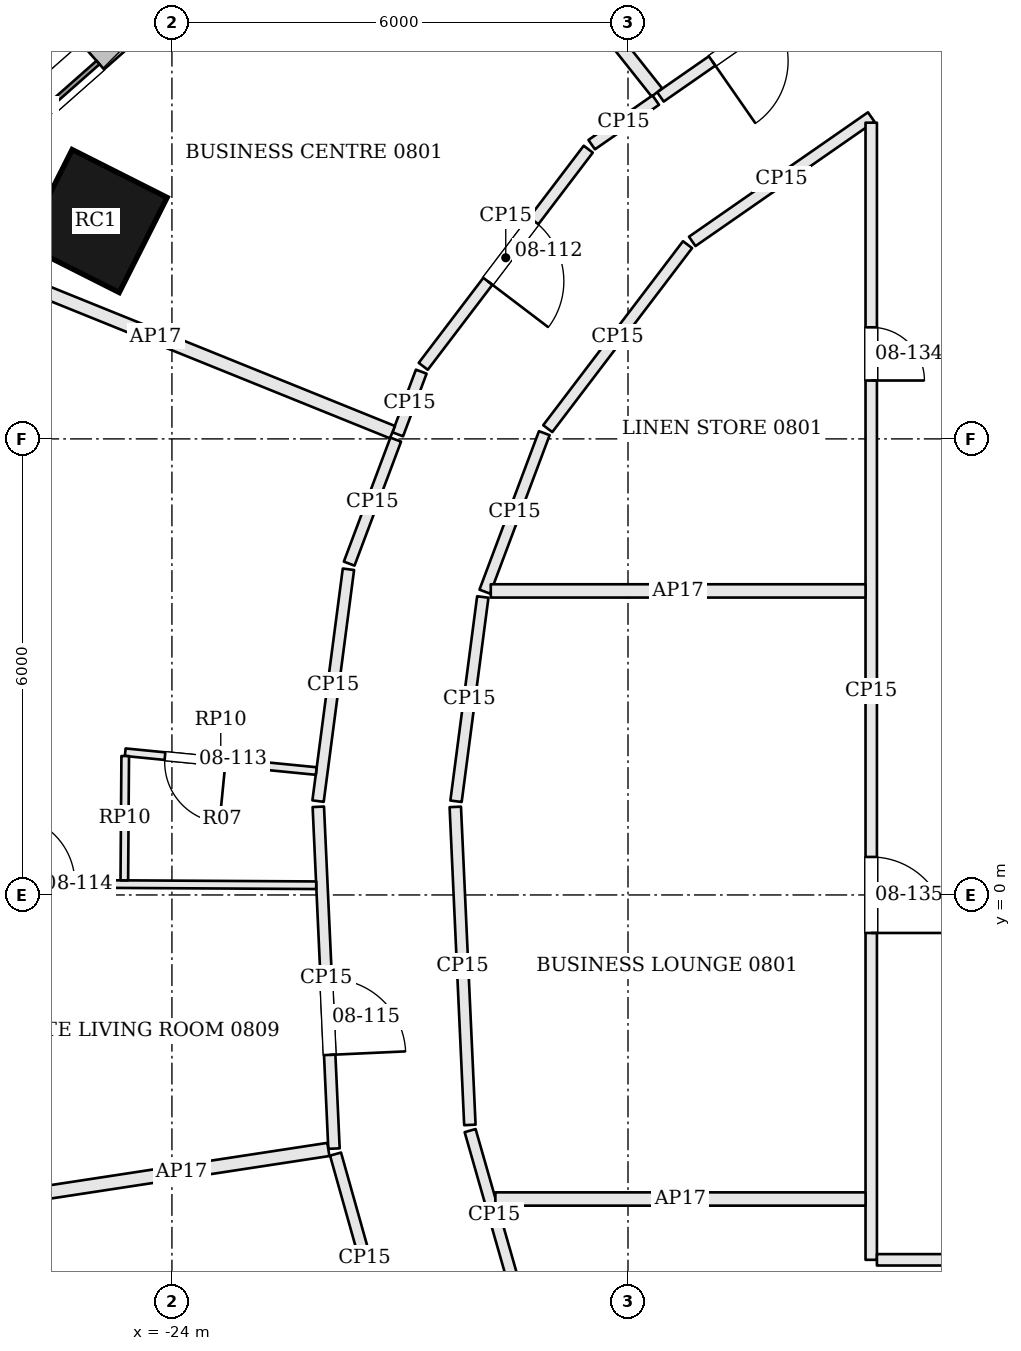
"""IFC4 building model, lengths in metres.
Left out: names, types, materials, properties, quantities, classifications, styles, units other than length and angle.
Written with IfcOpenShell. Run it as: python <this file> out.ifc"""

import sys

from ifc_helpers import new_model, si_unit, direction, frame, frame_2d, origin, origin_2d, place, context, subcontext, project, spatial, rectangle, extrude, element, fill, save


model = new_model("IFC4")
c1 = context("Model", 3, precision=1e-05, world=origin(), true_north=direction((0.0, 1.0)))
c2 = subcontext(c1, "Body", "Model", "MODEL_VIEW")
j1 = project(units=[si_unit("LENGTHUNIT", "METRE"), si_unit("PLANEANGLEUNIT", "RADIAN")], contexts=[c1])
p1 = place(None, origin())
s1 = spatial("IfcSite", under=j1, at=p1, CompositionType="ELEMENT")
p2 = place(p1, origin())
s2 = spatial("IfcBuilding", under=s1, at=p2, CompositionType="ELEMENT")
p3 = place(p2, frame((0.0, 0.0, 44.7)))
s3 = spatial("IfcBuildingStorey", under=s2, at=p3, CompositionType="ELEMENT", Elevation=44.7)
p4 = place(p3, frame((-25.003, 8.866, 0.0), z_axis=(0.0, 0.0, 1.0), x_axis=(-0.450098906028, -0.892978709036, 0.0)))
e1 = element("IfcColumn", 1, at=p4, inside=s3, PredefinedType="COLUMN", context=c2, shape_type="SweptSolid", body=[
    extrude(rectangle(XDim=1.4, YDim=1.4, at=origin_2d()), origin(), (0.0, 0.0, 1.0), 3.6),
])
p5 = place(p3, frame((-24.078, 11.88, 0.0), z_axis=(0.0, 0.0, 1.0), x_axis=(-0.749778352475, -0.661689067583, 0.0)))
e2 = element("IfcWall", 2, at=p5, inside=s3, PredefinedType="SOLIDWALL", context=c2, shape_type="SweptSolid", body=[
    extrude(rectangle(XDim=4.67, YDim=0.45, at=frame_2d((2.335, 0.0))), origin(), (0.0, 0.0, 1.0), 3.4),
])
p6 = place(p5, frame((1.285, 0.0, 0.9)))
e3 = element("IfcOpeningElement", 3, at=p6, cuts=e2, PredefinedType="OPENING", context=c2, shape_type="SweptSolid", body=[
    extrude(rectangle(XDim=2.1, YDim=2.0, at=frame_2d((1.05, 1.0))), frame((0.0, 0.235, 0.0), z_axis=(0.0, -1.0, 0.0), x_axis=(1.0, 0.0, 0.0)), (0.0, 0.0, 1.0), 0.47),
])
p7 = place(p3, frame((-14.862, 12.384, 0.0), z_axis=(0.0, 0.0, 1.0), x_axis=(-0.821144742038, -0.570719994939, 0.0)))
e4 = element("IfcWall", 4, at=p7, inside=s3, PredefinedType="PARTITIONING", context=c2, shape_type="SweptSolid", body=[
    extrude(rectangle(XDim=3.302, YDim=0.15, at=frame_2d((1.651, 0.0))), origin(), (0.0, 0.0, 1.0), 2.68),
])
p8 = place(p7, frame((1.474, 0.0, 0.0)))
e5 = element("IfcOpeningElement", 5, at=p8, cuts=e4, PredefinedType="OPENING", context=c2, shape_type="SweptSolid", body=[
    extrude(rectangle(XDim=1.0, YDim=2.1, at=frame_2d((0.5, 1.05))), frame((0.0, 0.085, 0.0), z_axis=(0.0, -1.0, 0.0), x_axis=(1.0, 0.0, 0.0)), (0.0, 0.0, 1.0), 0.17),
])
p9 = place(p3, frame((-20.146, 13.74, 0.0), z_axis=(0.0, 0.0, 1.0), x_axis=(0.621832273855, -0.783150447355, 0.0)))
e6 = element("IfcWall", 6, at=p9, inside=s3, PredefinedType="PARTITIONING", context=c2, shape_type="SweptSolid", body=[
    extrude(rectangle(XDim=4.062, YDim=0.175, at=frame_2d((2.031, 0.0))), origin(), (0.0, 0.0, 1.0), 2.68),
])
p10 = place(p3, frame((-17.635, 10.457, 0.0), z_axis=(0.0, 0.0, 1.0), x_axis=(-0.821171783561, -0.570681085969, 0.0)))
e7 = element("IfcWall", 7, at=p10, inside=s3, PredefinedType="PARTITIONING", context=c2, shape_type="SweptSolid", body=[
    extrude(rectangle(XDim=1.026, YDim=0.15, at=frame_2d((0.513, 0.0))), origin(), (0.0, 0.0, 1.0), 2.68),
])
p11 = place(p3, frame((-18.523, 9.811, 0.0), z_axis=(0.0, 0.0, 1.0), x_axis=(-0.605040130963, -0.796194976073, 0.0)))
e8 = element("IfcWall", 8, at=p11, inside=s3, PredefinedType="PARTITIONING", context=c2, shape_type="SweptSolid", body=[
    extrude(rectangle(XDim=3.588, YDim=0.15, at=frame_2d((1.794, 0.0))), origin(), (0.0, 0.0, 1.0), 2.68),
])
p12 = place(p11, frame((1.183, 0.0, 0.0)))
e9 = element("IfcOpeningElement", 9, at=p12, cuts=e8, PredefinedType="OPENING", context=c2, shape_type="SweptSolid", body=[
    extrude(rectangle(XDim=1.0, YDim=2.1, at=frame_2d((0.5, 1.05))), frame((0.0, 0.085, 0.0), z_axis=(0.0, -1.0, 0.0), x_axis=(1.0, 0.0, 0.0)), (0.0, 0.0, 1.0), 0.17),
])
p13 = place(p3, frame((-20.72, 6.885, 0.0), z_axis=(0.0, 0.0, 1.0), x_axis=(-0.351457811596, -0.936203720708, 0.0)))
e10 = element("IfcWall", 10, at=p13, inside=s3, PredefinedType="PARTITIONING", context=c2, shape_type="SweptSolid", body=[
    extrude(rectangle(XDim=0.88, YDim=0.15, at=frame_2d((0.44, 0.0))), origin(), (0.0, 0.0, 1.0), 2.68),
])
p14 = place(p3, frame((-27.329, 8.606, 0.0), z_axis=(0.0, 0.0, 1.0), x_axis=(0.92718069074, -0.374614424068, 0.0)))
e11 = element("IfcWall", 11, at=p14, inside=s3, PredefinedType="PARTITIONING", context=c2, shape_type="SweptSolid", body=[
    extrude(rectangle(XDim=6.72, YDim=0.175, at=frame_2d((3.36, 0.0))), origin(), (0.0, 0.0, 1.0), 2.68),
])
p15 = place(p3, frame((-21.056, 5.99, 0.0), z_axis=(0.0, 0.0, 1.0), x_axis=(-0.351445911603, -0.936208187967, 0.0)))
e12 = element("IfcWall", 12, at=p15, inside=s3, PredefinedType="PARTITIONING", context=c2, shape_type="SweptSolid", body=[
    extrude(rectangle(XDim=1.742, YDim=0.15, at=frame_2d((0.871, 0.0))), origin(), (0.0, 0.0, 1.0), 2.68),
])
p16 = place(p3, frame((-21.678, 4.285, 0.0), z_axis=(0.0, 0.0, 1.0), x_axis=(-0.129922755307, -0.991524118543, 0.0)))
e13 = element("IfcWall", 13, at=p16, inside=s3, PredefinedType="PARTITIONING", context=c2, shape_type="SweptSolid", body=[
    extrude(rectangle(XDim=3.076, YDim=0.15, at=frame_2d((1.538, 0.0))), origin(), (0.0, 0.0, 1.0), 2.68),
])
p17 = place(p3, frame((-22.074, 1.16, 0.0), z_axis=(0.0, 0.0, 1.0), x_axis=(0.04582833941, -0.998949329699, 0.0)))
e14 = element("IfcWall", 14, at=p17, inside=s3, PredefinedType="PARTITIONING", context=c2, shape_type="SweptSolid", body=[
    extrude(rectangle(XDim=4.501, YDim=0.15, at=frame_2d((2.251, 0.0))), origin(), (0.0, 0.0, 1.0), 2.68),
])
p18 = place(p17, frame((2.267, 0.0, 0.0)))
e15 = element("IfcOpeningElement", 15, at=p18, cuts=e14, PredefinedType="OPENING", context=c2, shape_type="SweptSolid", body=[
    extrude(rectangle(XDim=1.0, YDim=2.1, at=frame_2d((0.5, 1.05))), frame((0.0, 0.085, 0.0), z_axis=(0.0, -1.0, 0.0), x_axis=(1.0, 0.0, 0.0)), (0.0, 0.0, 1.0), 0.17),
])
p19 = place(p3, frame((-25.804, -3.938, 0.0), z_axis=(0.0, 0.0, 1.0), x_axis=(0.988549437975, 0.15089734484, 0.0)))
e16 = element("IfcWall", 16, at=p19, inside=s3, PredefinedType="PARTITIONING", context=c2, shape_type="SweptSolid", body=[
    extrude(rectangle(XDim=3.907, YDim=0.175, at=frame_2d((1.954, 0.0))), origin(), (0.0, 0.0, 1.0), 2.68),
])
p20 = place(p3, frame((-21.848, -3.409, 0.0), z_axis=(0.0, 0.0, 1.0), x_axis=(0.27056596431, -0.962701438119, 0.0)))
e17 = element("IfcWall", 17, at=p20, inside=s3, PredefinedType="PARTITIONING", context=c2, shape_type="SweptSolid", body=[
    extrude(rectangle(XDim=2.834, YDim=0.15, at=frame_2d((1.417, 0.0))), origin(), (0.0, 0.0, 1.0), 2.68),
])
p21 = place(p3, frame((-19.443, -5.319, 0.0), z_axis=(0.0, 0.0, 1.0), x_axis=(-0.274791002319, 0.961503980774, 0.0)))
e18 = element("IfcWall", 18, at=p21, inside=s3, PredefinedType="PARTITIONING", context=c2, shape_type="SweptSolid", body=[
    extrude(rectangle(XDim=2.307, YDim=0.15, at=frame_2d((1.154, 0.0))), origin(), (0.0, 0.0, 1.0), 2.68),
])
p22 = place(p3, frame((-20.08, -3.025, 0.0), z_axis=(0.0, 0.0, 1.0), x_axis=(-0.04581750387, 0.998949826738, 0.0)))
e19 = element("IfcWall", 19, at=p22, inside=s3, PredefinedType="PARTITIONING", context=c2, shape_type="SweptSolid", body=[
    extrude(rectangle(XDim=4.188, YDim=0.15, at=frame_2d((2.094, 0.0))), origin(), (0.0, 0.0, 1.0), 2.68),
])
p23 = place(p3, frame((-20.262, 1.233, 0.0), z_axis=(0.0, 0.0, 1.0), x_axis=(0.129897568593, 0.991527418518, 0.0)))
e20 = element("IfcWall", 20, at=p23, inside=s3, PredefinedType="PARTITIONING", context=c2, shape_type="SweptSolid", body=[
    extrude(rectangle(XDim=2.71, YDim=0.15, at=frame_2d((1.355, 0.0))), origin(), (0.0, 0.0, 1.0), 2.68),
])
p24 = place(p3, frame((-19.884, 3.99, 0.0), z_axis=(0.0, 0.0, 1.0), x_axis=(0.351423736928, 0.936216511884, 0.0)))
e21 = element("IfcWall", 21, at=p24, inside=s3, PredefinedType="PARTITIONING", context=c2, shape_type="SweptSolid", body=[
    extrude(rectangle(XDim=2.227, YDim=0.15, at=frame_2d((1.114, 0.0))), origin(), (0.0, 0.0, 1.0), 2.68),
])
p25 = place(p3, frame((-19.056, 6.135, 0.0), z_axis=(0.0, 0.0, 1.0), x_axis=(0.604999774258, 0.796225642107, 0.0)))
e22 = element("IfcWall", 22, at=p25, inside=s3, PredefinedType="PARTITIONING", context=c2, shape_type="SweptSolid", body=[
    extrude(rectangle(XDim=3.04, YDim=0.15, at=frame_2d((1.52, 0.0))), origin(), (0.0, 0.0, 1.0), 2.68),
])
p26 = place(p3, frame((-17.155, 8.598, 0.0), z_axis=(0.0, 0.0, 1.0), x_axis=(0.821087350938, 0.570802559673, 0.0)))
e23 = element("IfcWall", 23, at=p26, inside=s3, PredefinedType="PARTITIONING", context=c2, shape_type="SweptSolid", body=[
    extrude(rectangle(XDim=2.868, YDim=0.15, at=frame_2d((1.434, 0.0))), origin(), (0.0, 0.0, 1.0), 2.68),
])
p27 = place(p3, frame((-14.8, 10.16, 0.0), z_axis=(0.0, 0.0, 1.0), x_axis=(0.0, -1.0, 0.0)))
e24 = element("IfcWall", 24, at=p27, inside=s3, PredefinedType="PARTITIONING", context=c2, shape_type="SweptSolid", body=[
    extrude(rectangle(XDim=14.96, YDim=0.15, at=frame_2d((7.48, 0.0))), origin(), (0.0, 0.0, 1.0), 2.68),
])
p28 = place(p27, frame((2.692, 0.0, 0.0)))
e25 = element("IfcOpeningElement", 25, at=p28, cuts=e24, PredefinedType="OPENING", context=c2, shape_type="SweptSolid", body=[
    extrude(rectangle(XDim=0.7, YDim=2.1, at=frame_2d((0.35, 1.05))), frame((0.0, 0.085, 0.0), z_axis=(0.0, -1.0, 0.0), x_axis=(1.0, 0.0, 0.0)), (0.0, 0.0, 1.0), 0.17),
])
p29 = place(p27, frame((9.66, 0.0, 0.0)))
e26 = element("IfcOpeningElement", 26, at=p29, cuts=e24, PredefinedType="OPENING", context=c2, shape_type="SweptSolid", body=[
    extrude(rectangle(XDim=1.0, YDim=2.1, at=frame_2d((0.5, 1.05))), frame((0.0, 0.085, 0.0), z_axis=(0.0, -1.0, 0.0), x_axis=(1.0, 0.0, 0.0)), (0.0, 0.0, 1.0), 0.17),
])
p30 = place(p3, frame((-14.725, -4.8, 0.0), z_axis=(0.0, 0.0, 1.0), x_axis=(1.0, 0.0, 0.0)))
e27 = element("IfcWall", 27, at=p30, inside=s3, PredefinedType="PARTITIONING", context=c2, shape_type="SweptSolid", body=[
    extrude(rectangle(XDim=29.525, YDim=0.15, at=frame_2d((14.763, 0.0))), origin(), (0.0, 0.0, 1.0), 2.68),
])
p31 = place(p30, frame((2.075, 0.0, 0.0)))
e28 = element("IfcOpeningElement", 28, at=p31, cuts=e27, PredefinedType="OPENING", context=c2, shape_type="SweptSolid", body=[
    extrude(rectangle(XDim=1.0, YDim=2.4, at=frame_2d((0.5, 1.2))), frame((0.0, 0.085, 0.0), z_axis=(0.0, -1.0, 0.0), x_axis=(1.0, 0.0, 0.0)), (0.0, 0.0, 1.0), 0.17),
])
p32 = place(p30, frame((13.825, 0.0, 0.0)))
e29 = element("IfcOpeningElement", 29, at=p32, cuts=e27, PredefinedType="OPENING", context=c2, shape_type="SweptSolid", body=[
    extrude(rectangle(XDim=1.8, YDim=2.1, at=frame_2d((0.9, 1.05))), frame((0.0, 0.085, 0.0), z_axis=(0.0, -1.0, 0.0), x_axis=(1.0, 0.0, 0.0)), (0.0, 0.0, 1.0), 0.17),
])
p33 = place(p30, frame((26.375, 0.0, 0.0)))
e30 = element("IfcOpeningElement", 30, at=p33, cuts=e27, PredefinedType="OPENING", context=c2, shape_type="SweptSolid", body=[
    extrude(rectangle(XDim=1.0, YDim=2.4, at=frame_2d((0.5, 1.2))), frame((0.0, 0.085, 0.0), z_axis=(0.0, -1.0, 0.0), x_axis=(1.0, 0.0, 0.0)), (0.0, 0.0, 1.0), 0.17),
])
p34 = place(p3, frame((-30.571, 0.176, 0.0), z_axis=(0.0, 0.0, 1.0), x_axis=(0.999984039808, -0.005649790199, 0.0)))
e31 = element("IfcWall", 31, at=p34, inside=s3, PredefinedType="PARTITIONING", context=c2, shape_type="SweptSolid", body=[
    extrude(rectangle(XDim=8.47, YDim=0.1, at=frame_2d((4.235, 0.0))), origin(), (0.0, 0.0, 1.0), 2.68),
])
p35 = place(p34, frame((4.395, 0.0, 0.0)))
e32 = element("IfcOpeningElement", 32, at=p35, cuts=e31, PredefinedType="OPENING", context=c2, shape_type="SweptSolid", body=[
    extrude(rectangle(XDim=0.9, YDim=2.4, at=frame_2d((0.45, 1.2))), frame((0.0, 0.06, 0.0), z_axis=(0.0, -1.0, 0.0), x_axis=(1.0, 0.0, 0.0)), (0.0, 0.0, 1.0), 0.12),
])
p36 = place(p3, frame((-22.101, 1.63, 0.0), z_axis=(0.0, 0.0, 1.0), x_axis=(-0.99518257626, 0.098038971372, 0.0)))
e33 = element("IfcWall", 33, at=p36, inside=s3, PredefinedType="PARTITIONING", context=c2, shape_type="SweptSolid", body=[
    extrude(rectangle(XDim=2.525, YDim=0.1, at=frame_2d((1.263, 0.0))), origin(), (0.0, 0.0, 1.0), 2.68),
])
p37 = place(p36, frame((1.2, 0.0, 0.0)))
e34 = element("IfcOpeningElement", 34, at=p37, cuts=e33, PredefinedType="OPENING", context=c2, shape_type="SweptSolid", body=[
    extrude(rectangle(XDim=0.8, YDim=2.1, at=frame_2d((0.4, 1.05))), frame((0.0, 0.06, 0.0), z_axis=(0.0, -1.0, 0.0), x_axis=(1.0, 0.0, 0.0)), (0.0, 0.0, 1.0), 0.12),
])
p38 = place(p3, frame((-24.615, 1.828, 0.0), z_axis=(0.0, 0.0, 1.0), x_axis=(-0.007313237259, -0.999973257923, 0.0)))
e35 = element("IfcWall", 35, at=p38, inside=s3, PredefinedType="PARTITIONING", context=c2, shape_type="SweptSolid", body=[
    extrude(rectangle(XDim=1.636, YDim=0.1, at=frame_2d((0.818, 0.0))), origin(), (0.0, 0.0, 1.0), 2.68),
])
p39 = place(p3, frame((-19.805, 4.0, 0.0), z_axis=(0.0, 0.0, 1.0), x_axis=(1.0, 0.0, 0.0)))
e36 = element("IfcWall", 36, at=p39, inside=s3, PredefinedType="PARTITIONING", context=c2, shape_type="SweptSolid", body=[
    extrude(rectangle(XDim=4.93, YDim=0.175, at=frame_2d((2.465, 0.0))), origin(), (0.0, 0.0, 1.0), 2.68),
])
p40 = place(p3, frame((-19.745, -4.0, 0.0), z_axis=(0.0, 0.0, 1.0), x_axis=(1.0, 0.0, 0.0)))
e37 = element("IfcWall", 37, at=p40, inside=s3, PredefinedType="PARTITIONING", context=c2, shape_type="SweptSolid", body=[
    extrude(rectangle(XDim=4.87, YDim=0.175, at=frame_2d((2.435, 0.0))), origin(), (0.0, 0.0, 1.0), 2.68),
])
p41 = place(p6, origin())
e38 = element("IfcWindow", 38, at=p41, inside=s3, PartitioningType="SINGLE_PANEL", PredefinedType="WINDOW", context=c2, shape_type="SweptSolid", body=[
    extrude(rectangle(XDim=2.1, YDim=2.0, at=frame_2d((1.05, 1.0))), frame((0.0, 0.135, 0.0), z_axis=(0.0, -1.0, 0.0), x_axis=(1.0, 0.0, 0.0)), (0.0, 0.0, 1.0), 0.06),
])
fill(e3, e38)
p42 = place(p8, origin())
e39 = element("IfcDoor", 39, at=p42, inside=s3, OperationType="SINGLE_SWING_RIGHT", PredefinedType="DOOR", context=c2, shape_type="SweptSolid", body=[
    extrude(rectangle(XDim=1.0, YDim=2.1, at=frame_2d((0.5, 1.05))), frame((0.0, 0.025, 0.0), z_axis=(0.0, -1.0, 0.0), x_axis=(1.0, 0.0, 0.0)), (0.0, 0.0, 1.0), 0.05),
])
fill(e5, e39)
p43 = place(p12, origin())
e40 = element("IfcDoor", 40, at=p43, inside=s3, OperationType="SINGLE_SWING_RIGHT", PredefinedType="DOOR", context=c2, shape_type="SweptSolid", body=[
    extrude(rectangle(XDim=1.0, YDim=2.1, at=frame_2d((0.5, 1.05))), frame((0.0, 0.025, 0.0), z_axis=(0.0, -1.0, 0.0), x_axis=(1.0, 0.0, 0.0)), (0.0, 0.0, 1.0), 0.05),
])
fill(e9, e40)
p44 = place(p37, origin())
e41 = element("IfcDoor", 41, at=p44, inside=s3, OperationType="SINGLE_SWING_LEFT", PredefinedType="DOOR", context=c2, shape_type="SweptSolid", body=[
    extrude(rectangle(XDim=0.8, YDim=2.1, at=frame_2d((0.4, 1.05))), frame((0.0, 0.025, 0.0), z_axis=(0.0, -1.0, 0.0), x_axis=(1.0, 0.0, 0.0)), (0.0, 0.0, 1.0), 0.05),
])
fill(e34, e41)
p45 = place(p35, origin())
e42 = element("IfcDoor", 42, at=p45, inside=s3, OperationType="SINGLE_SWING_LEFT", PredefinedType="DOOR", context=c2, shape_type="SweptSolid", body=[
    extrude(rectangle(XDim=0.9, YDim=2.4, at=frame_2d((0.45, 1.2))), frame((0.0, 0.025, 0.0), z_axis=(0.0, -1.0, 0.0), x_axis=(1.0, 0.0, 0.0)), (0.0, 0.0, 1.0), 0.05),
])
fill(e32, e42)
p46 = place(p18, origin())
e43 = element("IfcDoor", 43, at=p46, inside=s3, OperationType="SINGLE_SWING_RIGHT", PredefinedType="DOOR", context=c2, shape_type="SweptSolid", body=[
    extrude(rectangle(XDim=1.0, YDim=2.1, at=frame_2d((0.5, 1.05))), frame((0.0, 0.025, 0.0), z_axis=(0.0, -1.0, 0.0), x_axis=(1.0, 0.0, 0.0)), (0.0, 0.0, 1.0), 0.05),
])
fill(e15, e43)
p47 = place(p28, origin())
e44 = element("IfcDoor", 44, at=p47, inside=s3, OperationType="SINGLE_SWING_RIGHT", PredefinedType="DOOR", context=c2, shape_type="SweptSolid", body=[
    extrude(rectangle(XDim=0.7, YDim=2.1, at=frame_2d((0.35, 1.05))), frame((0.0, 0.025, 0.0), z_axis=(0.0, -1.0, 0.0), x_axis=(1.0, 0.0, 0.0)), (0.0, 0.0, 1.0), 0.05),
])
fill(e25, e44)
p48 = place(p29, origin())
e45 = element("IfcDoor", 45, at=p48, inside=s3, OperationType="SINGLE_SWING_RIGHT", PredefinedType="DOOR", context=c2, shape_type="SweptSolid", body=[
    extrude(rectangle(XDim=1.0, YDim=2.1, at=frame_2d((0.5, 1.05))), frame((0.0, 0.025, 0.0), z_axis=(0.0, -1.0, 0.0), x_axis=(1.0, 0.0, 0.0)), (0.0, 0.0, 1.0), 0.05),
])
fill(e26, e45)
save(model, sys.argv[1])
